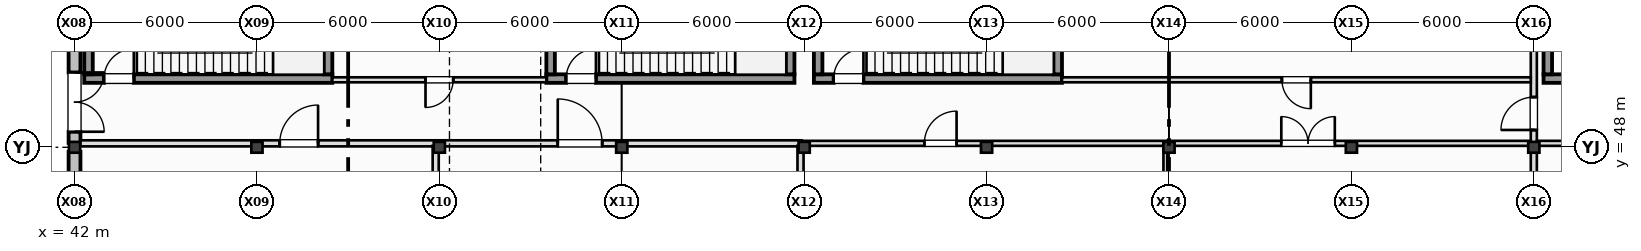
"""IFC4 building model, lengths in metres.
Left out: names, types, materials, properties, quantities, classifications, styles, units other than length and angle.
Written with IfcOpenShell. Run it as: python <this file> out.ifc"""

import sys

from ifc_helpers import new_model, si_unit, direction, frame, frame_2d, origin, origin_2d, place, context, subcontext, project, spatial, rectangle, i_section, extrude, element, fill, save


model = new_model("IFC4")
c1 = context("Model", 3, precision=1e-05, world=origin(), true_north=direction((0.0, 1.0)))
c2 = subcontext(c1, "Body", "Model", "MODEL_VIEW")
j1 = project(units=[si_unit("LENGTHUNIT", "METRE"), si_unit("PLANEANGLEUNIT", "RADIAN")], contexts=[c1])
p1 = place(None, origin())
s1 = spatial("IfcSite", under=j1, at=p1, CompositionType="ELEMENT")
p2 = place(p1, origin())
s2 = spatial("IfcBuilding", under=s1, at=p2, CompositionType="ELEMENT")
p3 = place(p2, origin())
s3 = spatial("IfcBuildingStorey", under=s2, at=p3, CompositionType="ELEMENT", Elevation=0.0)
for number, where, z_axis, x_axis in (
    (1, (42.0, 48.0, -0.41), (0.0, 0.0, 1.0), (1.0, 0.0, 0.0)),
    (2, (48.0, 48.0, -0.41), (0.0, 0.0, 1.0), (1.0, 0.0, 0.0)),
    (3, (54.0, 48.0, -0.41), (0.0, 0.0, 1.0), (1.0, 0.0, 0.0)),
    (4, (60.0, 48.0, -0.41), (0.0, 0.0, 1.0), (1.0, 0.0, 0.0)),
    (5, (66.0, 48.0, -0.41), (0.0, 0.0, 1.0), (1.0, 0.0, 0.0)),
    (6, (72.0, 48.0, -0.41), (0.0, 0.0, 1.0), (1.0, 0.0, 0.0)),
    (7, (78.0, 48.0, -0.41), (0.0, 0.0, 1.0), (1.0, 0.0, 0.0)),
    (8, (84.0, 48.0, -0.41), (0.0, 0.0, 1.0), (1.0, 0.0, 0.0)),
    (9, (90.0, 48.0, -0.41), (0.0, 0.0, 1.0), (1.0, 0.0, 0.0)),
):
    element("IfcColumn", number, at=place(p3, frame(where, z_axis=z_axis, x_axis=x_axis)), inside=s3, PredefinedType="COLUMN", context=c2, shape_type="SweptSolid", body=[
        extrude(i_section(OverallWidth=0.369, OverallDepth=0.356, WebThickness=0.011, FlangeThickness=0.018, at=origin_2d()), origin(), (0.0, 0.0, 1.0), 6.41),
    ])
p4 = place(p3, frame((42.0, 47.855, 0.0), z_axis=(0.0, 0.0, 1.0), x_axis=(0.0, -1.0, 0.0)))
e10 = element("IfcWall", 10, at=p4, inside=s3, PredefinedType="STANDARD", context=c2, shape_type="SweptSolid", body=[
    extrude(rectangle(XDim=5.71, YDim=0.39, at=frame_2d((2.855, 0.0))), origin(), (0.0, 0.0, 1.0), 5.044),
])
p5 = place(p3, frame((42.0, 53.855, 0.0), z_axis=(0.0, 0.0, 1.0), x_axis=(0.0, -1.0, 0.0)))
e11 = element("IfcWall", 11, at=p5, inside=s3, PredefinedType="STANDARD", context=c2, shape_type="SweptSolid", body=[
    extrude(rectangle(XDim=5.71, YDim=0.39, at=frame_2d((2.855, 0.0))), origin(), (0.0, 0.0, 1.0), 5.044),
])
p6 = place(p5, frame((3.394, 0.0, 0.0)))
e12 = element("IfcOpeningElement", 12, at=p6, cuts=e11, PredefinedType="OPENING", context=c2, shape_type="SweptSolid", body=[
    extrude(rectangle(XDim=1.95, YDim=2.35, at=frame_2d((0.975, 1.175))), frame((0.0, 0.205, 0.0), z_axis=(0.0, -1.0, 0.0), x_axis=(1.0, 0.0, 0.0)), (0.0, 0.0, 1.0), 0.41),
])
p7 = place(p3, frame((42.32, 50.26, 0.0), z_axis=(0.0, 0.0, 1.0), x_axis=(1.0, 0.0, 0.0)))
e13 = element("IfcWall", 13, at=p7, inside=s3, PredefinedType="SHEAR", context=c2, shape_type="SweptSolid", body=[
    extrude(rectangle(XDim=8.16, YDim=0.28, at=frame_2d((4.08, 0.0))), origin(), (0.0, 0.0, 1.0), 6.0),
])
p8 = place(p7, frame((0.65, 0.0, 0.0)))
e14 = element("IfcOpeningElement", 14, at=p8, cuts=e13, PredefinedType="OPENING", context=c2, shape_type="SweptSolid", body=[
    extrude(rectangle(XDim=0.98, YDim=2.15, at=frame_2d((0.49, 1.075))), frame((0.0, 0.15, 0.0), z_axis=(0.0, -1.0, 0.0), x_axis=(1.0, 0.0, 0.0)), (0.0, 0.0, 1.0), 0.3),
])
for number, where, z_axis, x_axis in (
    (15, (42.46, 53.4, 0.0), (0.0, 0.0, 1.0), (0.0, -1.0, 0.0)),
    (16, (50.34, 50.4, 0.0), (0.0, 0.0, 1.0), (0.0, 1.0, 0.0)),
):
    element("IfcWall", number, at=place(p3, frame(where, z_axis=z_axis, x_axis=x_axis)), inside=s3, PredefinedType="SHEAR", context=c2, shape_type="SweptSolid", body=[
        extrude(rectangle(XDim=3.0, YDim=0.28, at=frame_2d((1.5, 0.0))), origin(), (0.0, 0.0, 1.0), 6.0),
    ])
p9 = place(p3, frame((57.52, 50.26, 0.0), z_axis=(0.0, 0.0, 1.0), x_axis=(1.0, 0.0, 0.0)))
e17 = element("IfcWall", 17, at=p9, inside=s3, PredefinedType="SHEAR", context=c2, shape_type="SweptSolid", body=[
    extrude(rectangle(XDim=8.16, YDim=0.28, at=frame_2d((4.08, 0.0))), origin(), (0.0, 0.0, 1.0), 6.0),
])
p10 = place(p9, frame((0.65, 0.0, 0.0)))
e18 = element("IfcOpeningElement", 18, at=p10, cuts=e17, PredefinedType="OPENING", context=c2, shape_type="SweptSolid", body=[
    extrude(rectangle(XDim=0.98, YDim=2.15, at=frame_2d((0.49, 1.075))), frame((0.0, 0.15, 0.0), z_axis=(0.0, -1.0, 0.0), x_axis=(1.0, 0.0, 0.0)), (0.0, 0.0, 1.0), 0.3),
])
for number, where, z_axis, x_axis in (
    (19, (57.66, 53.4, 0.0), (0.0, 0.0, 1.0), (0.0, -1.0, 0.0)),
    (20, (65.54, 50.4, 0.0), (0.0, 0.0, 1.0), (0.0, 1.0, 0.0)),
):
    element("IfcWall", number, at=place(p3, frame(where, z_axis=z_axis, x_axis=x_axis)), inside=s3, PredefinedType="SHEAR", context=c2, shape_type="SweptSolid", body=[
        extrude(rectangle(XDim=3.0, YDim=0.28, at=frame_2d((1.5, 0.0))), origin(), (0.0, 0.0, 1.0), 6.0),
    ])
p11 = place(p3, frame((90.32, 50.26, 0.0), z_axis=(0.0, 0.0, 1.0), x_axis=(1.0, 0.0, 0.0)))
e21 = element("IfcWall", 21, at=p11, inside=s3, PredefinedType="SHEAR", context=c2, shape_type="SweptSolid", body=[
    extrude(rectangle(XDim=8.16, YDim=0.28, at=frame_2d((4.08, 0.0))), origin(), (0.0, 0.0, 1.0), 6.0),
])
p12 = place(p11, frame((0.65, 0.0, 0.0)))
e22 = element("IfcOpeningElement", 22, at=p12, cuts=e21, PredefinedType="OPENING", context=c2, shape_type="SweptSolid", body=[
    extrude(rectangle(XDim=0.98, YDim=2.15, at=frame_2d((0.49, 1.075))), frame((0.0, 0.15, 0.0), z_axis=(0.0, -1.0, 0.0), x_axis=(1.0, 0.0, 0.0)), (0.0, 0.0, 1.0), 0.3),
])
p13 = place(p3, frame((90.46, 53.4, 0.0), z_axis=(0.0, 0.0, 1.0), x_axis=(0.0, -1.0, 0.0)))
e23 = element("IfcWall", 23, at=p13, inside=s3, PredefinedType="SHEAR", context=c2, shape_type="SweptSolid", body=[
    extrude(rectangle(XDim=3.0, YDim=0.28, at=frame_2d((1.5, 0.0))), origin(), (0.0, 0.0, 1.0), 6.0),
])
p14 = place(p3, frame((66.32, 50.26, 0.0), z_axis=(0.0, 0.0, 1.0), x_axis=(1.0, 0.0, 0.0)))
e24 = element("IfcWall", 24, at=p14, inside=s3, PredefinedType="SHEAR", context=c2, shape_type="SweptSolid", body=[
    extrude(rectangle(XDim=8.16, YDim=0.28, at=frame_2d((4.08, 0.0))), origin(), (0.0, 0.0, 1.0), 6.0),
])
p15 = place(p14, frame((0.65, 0.0, 0.0)))
e25 = element("IfcOpeningElement", 25, at=p15, cuts=e24, PredefinedType="OPENING", context=c2, shape_type="SweptSolid", body=[
    extrude(rectangle(XDim=0.98, YDim=2.15, at=frame_2d((0.49, 1.075))), frame((0.0, 0.15, 0.0), z_axis=(0.0, -1.0, 0.0), x_axis=(1.0, 0.0, 0.0)), (0.0, 0.0, 1.0), 0.3),
])
for number, where, z_axis, x_axis in (
    (26, (66.46, 53.4, 0.0), (0.0, 0.0, 1.0), (0.0, -1.0, 0.0)),
    (27, (74.34, 50.4, 0.0), (0.0, 0.0, 1.0), (0.0, 1.0, 0.0)),
):
    element("IfcWall", number, at=place(p3, frame(where, z_axis=z_axis, x_axis=x_axis)), inside=s3, PredefinedType="SHEAR", context=c2, shape_type="SweptSolid", body=[
        extrude(rectangle(XDim=3.0, YDim=0.28, at=frame_2d((1.5, 0.0))), origin(), (0.0, 0.0, 1.0), 6.0),
    ])
p16 = place(p3, frame((90.0, 42.18, 0.0), z_axis=(0.0, 0.0, 1.0), x_axis=(0.0, 1.0, 0.0)))
e28 = element("IfcWall", 28, at=p16, inside=s3, PredefinedType="PARTITIONING", context=c2, shape_type="SweptSolid", body=[
    extrude(rectangle(XDim=5.72, YDim=0.2, at=frame_2d((2.86, 0.0))), origin(), (0.0, 0.0, 1.0), 5.044),
])
p17 = place(p3, frame((90.0, 48.05, 0.0), z_axis=(0.0, 0.0, 1.0), x_axis=(0.0, 1.0, 0.0)))
e29 = element("IfcWall", 29, at=p17, inside=s3, PredefinedType="PARTITIONING", context=c2, shape_type="SweptSolid", body=[
    extrude(rectangle(XDim=5.77, YDim=0.2, at=frame_2d((2.885, 0.0))), origin(), (0.0, 0.0, 1.0), 5.044),
])
p18 = place(p17, frame((0.52, 0.0, 0.0)))
e30 = element("IfcOpeningElement", 30, at=p18, cuts=e29, PredefinedType="OPENING", context=c2, shape_type="SweptSolid", body=[
    extrude(rectangle(XDim=1.08, YDim=2.14, at=frame_2d((0.54, 1.07))), frame((0.0, 0.11, 0.0), z_axis=(0.0, -1.0, 0.0), x_axis=(1.0, 0.0, 0.0)), (0.0, 0.0, 1.0), 0.22),
])
p19 = place(p3, frame((42.195, 48.13, 0.0), z_axis=(0.0, 0.0, 1.0), x_axis=(1.0, 0.0, 0.0)))
e31 = element("IfcWall", 31, at=p19, inside=s3, PredefinedType="PARTITIONING", context=c2, shape_type="SweptSolid", body=[
    extrude(rectangle(XDim=11.725, YDim=0.2, at=frame_2d((5.862, 0.0))), origin(), (0.0, 0.0, 1.0), 5.035),
])
p20 = place(p19, frame((6.556, 0.0, 0.0)))
e32 = element("IfcOpeningElement", 32, at=p20, cuts=e31, PredefinedType="OPENING", context=c2, shape_type="SweptSolid", body=[
    extrude(rectangle(XDim=1.26, YDim=2.2, at=frame_2d((0.63, 1.1))), frame((0.0, 0.11, 0.0), z_axis=(0.0, -1.0, 0.0), x_axis=(1.0, 0.0, 0.0)), (0.0, 0.0, 1.0), 0.22),
])
p21 = place(p3, frame((53.88, 48.05, 0.0), z_axis=(0.0, 0.0, 1.0), x_axis=(0.0, -1.0, 0.0)))
e33 = element("IfcWall", 33, at=p21, inside=s3, PredefinedType="PARTITIONING", context=c2, shape_type="SweptSolid", body=[
    extrude(rectangle(XDim=5.97, YDim=0.2, at=frame_2d((2.985, 0.0))), origin(), (0.0, 0.0, 1.0), 5.044),
])
p22 = place(p3, frame((53.98, 48.13, 0.0), z_axis=(0.0, 0.0, 1.0), x_axis=(1.0, 0.0, 0.0)))
e34 = element("IfcWall", 34, at=p22, inside=s3, PredefinedType="PARTITIONING", context=c2, shape_type="SweptSolid", body=[
    extrude(rectangle(XDim=11.94, YDim=0.2, at=frame_2d((5.97, 0.0))), origin(), (0.0, 0.0, 1.0), 5.035),
])
p23 = place(p22, frame((3.915, 0.0, 0.0)))
e35 = element("IfcOpeningElement", 35, at=p23, cuts=e34, PredefinedType="OPENING", context=c2, shape_type="SweptSolid", body=[
    extrude(rectangle(XDim=1.46, YDim=2.3, at=frame_2d((0.73, 1.15))), frame((0.0, 0.11, 0.0), z_axis=(0.0, -1.0, 0.0), x_axis=(1.0, 0.0, 0.0)), (0.0, 0.0, 1.0), 0.22),
])
p24 = place(p3, frame((65.88, 48.05, 0.0), z_axis=(0.0, 0.0, 1.0), x_axis=(0.0, -1.0, 0.0)))
e36 = element("IfcWall", 36, at=p24, inside=s3, PredefinedType="PARTITIONING", context=c2, shape_type="SweptSolid", body=[
    extrude(rectangle(XDim=5.97, YDim=0.2, at=frame_2d((2.985, 0.0))), origin(), (0.0, 0.0, 1.0), 5.044),
])
p25 = place(p3, frame((65.98, 48.13, 0.0), z_axis=(0.0, 0.0, 1.0), x_axis=(1.0, 0.0, 0.0)))
e37 = element("IfcWall", 37, at=p25, inside=s3, PredefinedType="PARTITIONING", context=c2, shape_type="SweptSolid", body=[
    extrude(rectangle(XDim=11.923, YDim=0.165, at=frame_2d((5.961, 0.0))), origin(), (0.0, 0.0, 1.0), 5.035),
])
p26 = place(p25, frame((3.973, 0.0, 0.0)))
e38 = element("IfcOpeningElement", 38, at=p26, cuts=e37, PredefinedType="OPENING", context=c2, shape_type="SweptSolid", body=[
    extrude(rectangle(XDim=1.06, YDim=2.25, at=frame_2d((0.53, 1.125))), frame((0.0, 0.093, 0.0), z_axis=(0.0, -1.0, 0.0), x_axis=(1.0, 0.0, 0.0)), (0.0, 0.0, 1.0), 0.185),
])
p27 = place(p3, frame((77.88, 48.05, 0.0), z_axis=(0.0, 0.0, 1.0), x_axis=(0.0, -1.0, 0.0)))
e39 = element("IfcWall", 39, at=p27, inside=s3, PredefinedType="PARTITIONING", context=c2, shape_type="SweptSolid", body=[
    extrude(rectangle(XDim=5.933, YDim=0.125, at=frame_2d((2.966, 0.0))), origin(), (0.0, 0.0, 1.0), 5.044),
])
p28 = place(p3, frame((77.942, 48.13, 0.0), z_axis=(0.0, 0.0, 1.0), x_axis=(1.0, 0.0, 0.0)))
e40 = element("IfcWall", 40, at=p28, inside=s3, PredefinedType="PARTITIONING", context=c2, shape_type="SweptSolid", body=[
    extrude(rectangle(XDim=11.958, YDim=0.165, at=frame_2d((5.979, 0.0))), origin(), (0.0, 0.0, 1.0), 5.035),
])
p29 = place(p28, frame((3.752, 0.0, 0.0)))
e41 = element("IfcOpeningElement", 41, at=p29, cuts=e40, PredefinedType="OPENING", context=c2, shape_type="SweptSolid", body=[
    extrude(rectangle(XDim=1.76, YDim=2.26, at=frame_2d((0.88, 1.13))), frame((0.0, 0.093, 0.0), z_axis=(0.0, -1.0, 0.0), x_axis=(1.0, 0.0, 0.0)), (0.0, 0.0, 1.0), 0.185),
])
p30 = place(p3, frame((57.52, 50.22, 0.0), z_axis=(0.0, 0.0, 1.0), x_axis=(-1.0, 0.0, 0.0)))
e42 = element("IfcWall", 42, at=p30, inside=s3, PredefinedType="PARTITIONING", context=c2, shape_type="SweptSolid", body=[
    extrude(rectangle(XDim=7.04, YDim=0.165, at=frame_2d((3.52, 0.0))), origin(), (0.0, 0.0, 1.0), 5.68),
])
p31 = place(p30, frame((3.065, 0.0, 0.0)))
e43 = element("IfcOpeningElement", 43, at=p31, cuts=e42, PredefinedType="OPENING", context=c2, shape_type="SweptSolid", body=[
    extrude(rectangle(XDim=0.91, YDim=2.1, at=frame_2d((0.455, 1.05))), frame((0.0, 0.093, 0.0), z_axis=(0.0, -1.0, 0.0), x_axis=(1.0, 0.0, 0.0)), (0.0, 0.0, 1.0), 0.185),
])
p32 = place(p3, frame((89.9, 50.22, 0.0), z_axis=(0.0, 0.0, 1.0), x_axis=(-1.0, 0.0, 0.0)))
e44 = element("IfcWall", 44, at=p32, inside=s3, PredefinedType="PARTITIONING", context=c2, shape_type="SweptSolid", body=[
    extrude(rectangle(XDim=15.42, YDim=0.165, at=frame_2d((7.71, 0.0))), origin(), (0.0, 0.0, 1.0), 5.68),
])
p33 = place(p32, frame((7.235, 0.0, 0.0)))
e45 = element("IfcOpeningElement", 45, at=p33, cuts=e44, PredefinedType="OPENING", context=c2, shape_type="SweptSolid", body=[
    extrude(rectangle(XDim=0.95, YDim=2.12, at=frame_2d((0.475, 1.06))), frame((0.0, 0.093, 0.0), z_axis=(0.0, -1.0, 0.0), x_axis=(1.0, 0.0, 0.0)), (0.0, 0.0, 1.0), 0.185),
])
p34 = place(p3, frame((90.1, 48.13, 0.0), z_axis=(0.0, 0.0, 1.0), x_axis=(1.0, 0.0, 0.0)))
e46 = element("IfcWall", 46, at=p34, inside=s3, PredefinedType="PARTITIONING", context=c2, shape_type="SweptSolid", body=[
    extrude(rectangle(XDim=6.083, YDim=0.165, at=frame_2d((3.041, 0.0))), origin(), (0.0, 0.0, 1.0), 5.035),
])
p35 = place(p34, frame((2.411, 0.0, 0.0)))
e47 = element("IfcOpeningElement", 47, at=p35, cuts=e46, PredefinedType="OPENING", context=c2, shape_type="SweptSolid", body=[
    extrude(rectangle(XDim=1.26, YDim=2.2, at=frame_2d((0.63, 1.1))), frame((0.0, 0.093, 0.0), z_axis=(0.0, -1.0, 0.0), x_axis=(1.0, 0.0, 0.0)), (0.0, 0.0, 1.0), 0.185),
])
p36 = place(p6, frame((1.95, 0.0, 0.0), z_axis=(0.0, 0.0, 1.0), x_axis=(-1.0, 0.0, 0.0)))
e48 = element("IfcDoor", 48, at=p36, inside=s3, OperationType="DOUBLE_DOOR_SINGLE_SWING", PredefinedType="DOOR", context=c2, shape_type="SweptSolid", body=[
    extrude(rectangle(XDim=1.95, YDim=2.35, at=frame_2d((0.975, 1.175))), frame((0.0, 0.025, 0.0), z_axis=(0.0, -1.0, 0.0), x_axis=(1.0, 0.0, 0.0)), (0.0, 0.0, 1.0), 0.05),
])
fill(e12, e48)
p37 = place(p8, origin())
e49 = element("IfcDoor", 49, at=p37, inside=s3, OperationType="SINGLE_SWING_RIGHT", PredefinedType="DOOR", context=c2, shape_type="SweptSolid", body=[
    extrude(rectangle(XDim=0.98, YDim=2.15, at=frame_2d((0.49, 1.075))), frame((0.0, 0.025, 0.0), z_axis=(0.0, -1.0, 0.0), x_axis=(1.0, 0.0, 0.0)), (0.0, 0.0, 1.0), 0.05),
])
fill(e14, e49)
p38 = place(p10, origin())
e50 = element("IfcDoor", 50, at=p38, inside=s3, OperationType="SINGLE_SWING_RIGHT", PredefinedType="DOOR", context=c2, shape_type="SweptSolid", body=[
    extrude(rectangle(XDim=0.98, YDim=2.15, at=frame_2d((0.49, 1.075))), frame((0.0, 0.025, 0.0), z_axis=(0.0, -1.0, 0.0), x_axis=(1.0, 0.0, 0.0)), (0.0, 0.0, 1.0), 0.05),
])
fill(e18, e50)
p39 = place(p15, origin())
e51 = element("IfcDoor", 51, at=p39, inside=s3, OperationType="SINGLE_SWING_RIGHT", PredefinedType="DOOR", context=c2, shape_type="SweptSolid", body=[
    extrude(rectangle(XDim=0.98, YDim=2.15, at=frame_2d((0.49, 1.075))), frame((0.0, 0.025, 0.0), z_axis=(0.0, -1.0, 0.0), x_axis=(1.0, 0.0, 0.0)), (0.0, 0.0, 1.0), 0.05),
])
fill(e25, e51)
p40 = place(p18, frame((1.08, 0.0, 0.0), z_axis=(0.0, 0.0, 1.0), x_axis=(-1.0, 0.0, 0.0)))
e52 = element("IfcDoor", 52, at=p40, inside=s3, OperationType="SINGLE_SWING_LEFT", PredefinedType="DOOR", context=c2, shape_type="SweptSolid", body=[
    extrude(rectangle(XDim=1.08, YDim=2.14, at=frame_2d((0.54, 1.07))), frame((0.0, 0.025, 0.0), z_axis=(0.0, -1.0, 0.0), x_axis=(1.0, 0.0, 0.0)), (0.0, 0.0, 1.0), 0.05),
])
fill(e30, e52)
p41 = place(p20, frame((1.26, 0.0, 0.0), z_axis=(0.0, 0.0, 1.0), x_axis=(-1.0, 0.0, 0.0)))
e53 = element("IfcDoor", 53, at=p41, inside=s3, OperationType="SINGLE_SWING_RIGHT", PredefinedType="DOOR", context=c2, shape_type="SweptSolid", body=[
    extrude(rectangle(XDim=1.26, YDim=2.2, at=frame_2d((0.63, 1.1))), frame((0.0, 0.025, 0.0), z_axis=(0.0, -1.0, 0.0), x_axis=(1.0, 0.0, 0.0)), (0.0, 0.0, 1.0), 0.05),
])
fill(e32, e53)
p42 = place(p23, frame((1.46, 0.0, 0.0), z_axis=(0.0, 0.0, 1.0), x_axis=(-1.0, 0.0, 0.0)))
e54 = element("IfcDoor", 54, at=p42, inside=s3, OperationType="SINGLE_SWING_LEFT", PredefinedType="DOOR", context=c2, shape_type="SweptSolid", body=[
    extrude(rectangle(XDim=1.46, YDim=2.3, at=frame_2d((0.73, 1.15))), frame((0.0, 0.025, 0.0), z_axis=(0.0, -1.0, 0.0), x_axis=(1.0, 0.0, 0.0)), (0.0, 0.0, 1.0), 0.05),
])
fill(e35, e54)
p43 = place(p26, frame((1.06, 0.0, 0.0), z_axis=(0.0, 0.0, 1.0), x_axis=(-1.0, 0.0, 0.0)))
e55 = element("IfcDoor", 55, at=p43, inside=s3, OperationType="SINGLE_SWING_RIGHT", PredefinedType="DOOR", context=c2, shape_type="SweptSolid", body=[
    extrude(rectangle(XDim=1.06, YDim=2.25, at=frame_2d((0.53, 1.125))), frame((0.0, 0.025, 0.0), z_axis=(0.0, -1.0, 0.0), x_axis=(1.0, 0.0, 0.0)), (0.0, 0.0, 1.0), 0.05),
])
fill(e38, e55)
p44 = place(p29, frame((1.76, 0.0, 0.0), z_axis=(0.0, 0.0, 1.0), x_axis=(-1.0, 0.0, 0.0)))
e56 = element("IfcDoor", 56, at=p44, inside=s3, OperationType="DOUBLE_DOOR_SINGLE_SWING", PredefinedType="DOOR", context=c2, shape_type="SweptSolid", body=[
    extrude(rectangle(XDim=1.76, YDim=2.26, at=frame_2d((0.88, 1.13))), frame((0.0, 0.025, 0.0), z_axis=(0.0, -1.0, 0.0), x_axis=(1.0, 0.0, 0.0)), (0.0, 0.0, 1.0), 0.05),
])
fill(e41, e56)
p45 = place(p31, frame((0.91, 0.0, 0.0), z_axis=(0.0, 0.0, 1.0), x_axis=(-1.0, 0.0, 0.0)))
e57 = element("IfcDoor", 57, at=p45, inside=s3, OperationType="SINGLE_SWING_RIGHT", PredefinedType="DOOR", context=c2, shape_type="SweptSolid", body=[
    extrude(rectangle(XDim=0.91, YDim=2.1, at=frame_2d((0.455, 1.05))), frame((0.0, 0.025, 0.0), z_axis=(0.0, -1.0, 0.0), x_axis=(1.0, 0.0, 0.0)), (0.0, 0.0, 1.0), 0.05),
])
fill(e43, e57)
p46 = place(p33, frame((0.95, 0.0, 0.0), z_axis=(0.0, 0.0, 1.0), x_axis=(-1.0, 0.0, 0.0)))
e58 = element("IfcDoor", 58, at=p46, inside=s3, OperationType="SINGLE_SWING_LEFT", PredefinedType="DOOR", context=c2, shape_type="SweptSolid", body=[
    extrude(rectangle(XDim=0.95, YDim=2.12, at=frame_2d((0.475, 1.06))), frame((0.0, 0.025, 0.0), z_axis=(0.0, -1.0, 0.0), x_axis=(1.0, 0.0, 0.0)), (0.0, 0.0, 1.0), 0.05),
])
fill(e45, e58)
save(model, sys.argv[1])
